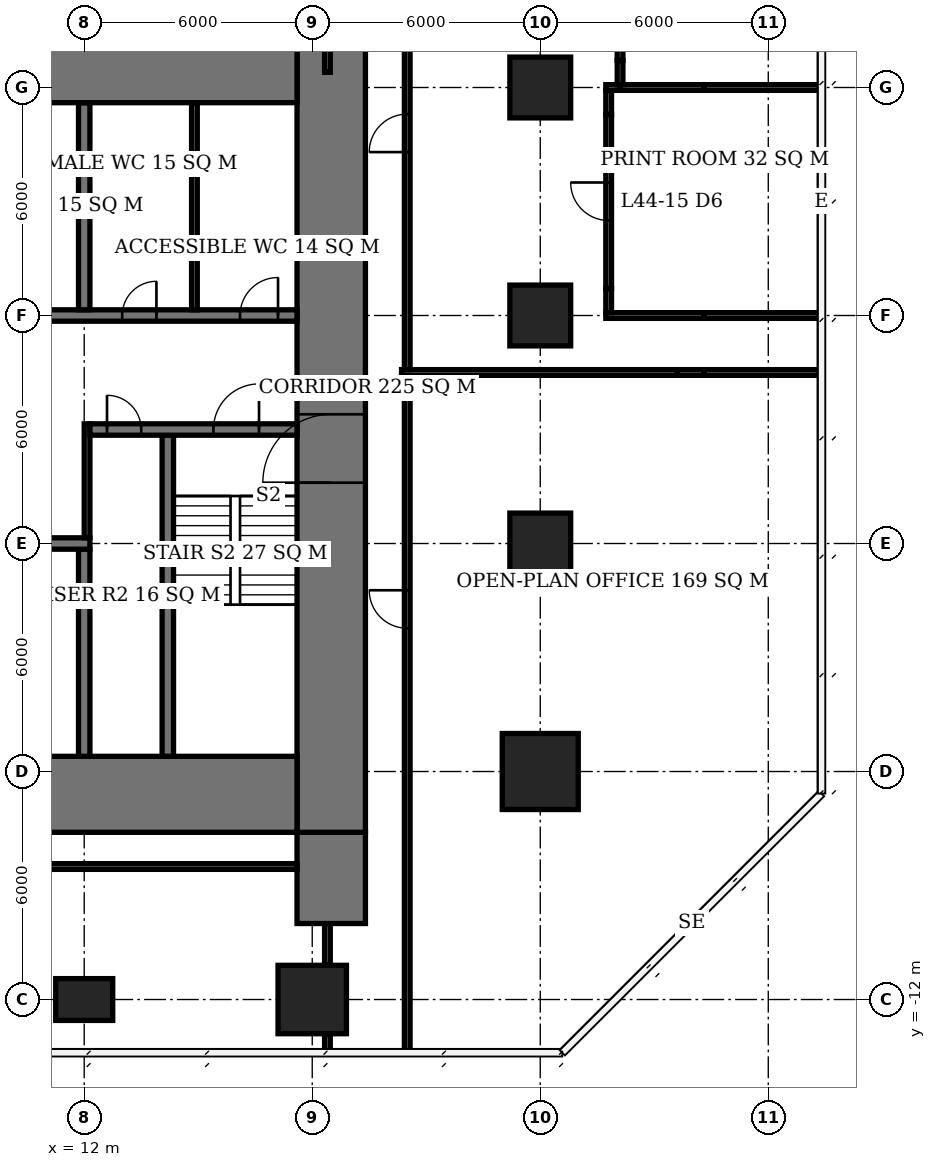
"""IFC4 building model, lengths in metres.
Left out: names, types, materials, properties, quantities, classifications, styles, units other than length and angle.
Written with IfcOpenShell. Run it as: python <this file> out.ifc"""

import sys

from ifc_helpers import new_model, si_unit, direction, frame, frame_2d, origin, origin_2d, place, context, subcontext, project, spatial, rectangle, extrude, element, fill, save


model = new_model("IFC4")
c1 = context("Model", 3, precision=1e-05, world=origin(), true_north=direction((0.0, 1.0)))
c2 = subcontext(c1, "Body", "Model", "MODEL_VIEW")
j1 = project(units=[si_unit("LENGTHUNIT", "METRE"), si_unit("PLANEANGLEUNIT", "RADIAN")], contexts=[c1])
p1 = place(None, origin())
s1 = spatial("IfcSite", under=j1, at=p1, CompositionType="ELEMENT")
p2 = place(p1, origin())
s2 = spatial("IfcBuilding", under=s1, at=p2, CompositionType="ELEMENT")
p3 = place(p2, frame((0.0, 0.0, 181.1)))
s3 = spatial("IfcBuildingStorey", under=s2, at=p3, CompositionType="ELEMENT", Elevation=181.1)
p4 = place(p3, frame((12.0, -12.0, 0.0), z_axis=(0.0, 0.0, 1.0), x_axis=(1.0, 0.0, 0.0)))
e1 = element("IfcColumn", 1, at=p4, inside=s3, PredefinedType="COLUMN", context=c2, shape_type="SweptSolid", body=[
    extrude(rectangle(XDim=1.5, YDim=1.1, at=origin_2d()), origin(), (0.0, 0.0, 1.0), 3.9),
])
p5 = place(p3, frame((18.0, -12.0, 0.0), z_axis=(0.0, 0.0, 1.0), x_axis=(1.0, 0.0, 0.0)))
e2 = element("IfcColumn", 2, at=p5, inside=s3, PredefinedType="COLUMN", context=c2, shape_type="SweptSolid", body=[
    extrude(rectangle(XDim=1.8, YDim=1.8, at=origin_2d()), origin(), (0.0, 0.0, 1.0), 3.9),
])
p6 = place(p3, frame((24.0, -6.0, 0.0), z_axis=(0.0, 0.0, 1.0), x_axis=(1.0, 0.0, 0.0)))
e3 = element("IfcColumn", 3, at=p6, inside=s3, PredefinedType="COLUMN", context=c2, shape_type="SweptSolid", body=[
    extrude(rectangle(XDim=2.0, YDim=2.0, at=origin_2d()), origin(), (0.0, 0.0, 1.0), 3.9),
])
for number, where, z_axis, x_axis in (
    (4, (24.0, 0.0, 0.0), (0.0, 0.0, 1.0), (1.0, 0.0, 0.0)),
    (5, (24.0, 6.0, 0.0), (0.0, 0.0, 1.0), (1.0, 0.0, 0.0)),
    (6, (24.0, 12.0, 0.0), (0.0, 0.0, 1.0), (1.0, 0.0, 0.0)),
):
    element("IfcColumn", number, at=place(p3, frame(where, z_axis=z_axis, x_axis=x_axis)), inside=s3, PredefinedType="COLUMN", context=c2, shape_type="SweptSolid", body=[
        extrude(rectangle(XDim=1.6, YDim=1.6, at=origin_2d()), origin(), (0.0, 0.0, 1.0), 3.9),
    ])
for number, where, z_axis, x_axis in (
    (7, (-5.6, -6.6, 0.0), (0.0, 0.0, 1.0), (1.0, 0.0, 0.0)),
    (8, (-5.6, 12.6, 0.0), (0.0, 0.0, 1.0), (1.0, 0.0, 0.0)),
):
    element("IfcWall", number, at=place(p3, frame(where, z_axis=z_axis, x_axis=x_axis)), inside=s3, PredefinedType="SHEAR", context=c2, shape_type="SweptSolid", body=[
        extrude(rectangle(XDim=23.2, YDim=2.0, at=frame_2d((11.6, 0.0))), origin(), (0.0, 0.0, 1.0), 3.9),
    ])
p7 = place(p3, frame((18.5, -7.6, 0.0), z_axis=(0.0, 0.0, 1.0), x_axis=(0.0, 1.0, 0.0)))
e9 = element("IfcWall", 9, at=p7, inside=s3, PredefinedType="SHEAR", context=c2, shape_type="SweptSolid", body=[
    extrude(rectangle(XDim=21.2, YDim=1.8, at=frame_2d((10.6, 0.0))), origin(), (0.0, 0.0, 1.0), 3.9),
])
p8 = place(p7, frame((9.2, 0.0, 0.0)))
e10 = element("IfcOpeningElement", 10, at=p8, cuts=e9, PredefinedType="OPENING", context=c2, shape_type="SweptSolid", body=[
    extrude(rectangle(XDim=1.8, YDim=2.4, at=frame_2d((0.9, 1.2))), frame((0.0, 0.91, 0.0), z_axis=(0.0, -1.0, 0.0), x_axis=(1.0, 0.0, 0.0)), (0.0, 0.0, 1.0), 1.82),
])
p9 = place(p3, frame((18.5, -10.0, 0.0), z_axis=(0.0, 0.0, 1.0), x_axis=(0.0, 1.0, 0.0)))
e11 = element("IfcWall", 11, at=p9, inside=s3, PredefinedType="SHEAR", context=c2, shape_type="SweptSolid", body=[
    extrude(rectangle(XDim=2.4, YDim=1.8, at=frame_2d((1.2, 0.0))), origin(), (0.0, 0.0, 1.0), 3.9),
])
p10 = place(p3, frame((-5.6, 0.0, 0.0), z_axis=(0.0, 0.0, 1.0), x_axis=(1.0, 0.0, 0.0)))
e12 = element("IfcWall", 12, at=p10, inside=s3, PredefinedType="SHEAR", context=c2, shape_type="SweptSolid", body=[
    extrude(rectangle(XDim=17.75, YDim=0.3, at=frame_2d((8.875, 0.0))), origin(), (0.0, 0.0, 1.0), 3.9),
])
p11 = place(p10, frame((0.6, 0.0, 0.0)))
e13 = element("IfcOpeningElement", 13, at=p11, cuts=e12, PredefinedType="OPENING", context=c2, shape_type="SweptSolid", body=[
    extrude(rectangle(XDim=0.9, YDim=2.1, at=frame_2d((0.45, 1.05))), frame((0.0, 0.16, 0.0), z_axis=(0.0, -1.0, 0.0), x_axis=(1.0, 0.0, 0.0)), (0.0, 0.0, 1.0), 0.32),
])
p12 = place(p10, frame((3.7, 0.0, 0.0)))
e14 = element("IfcOpeningElement", 14, at=p12, cuts=e12, PredefinedType="OPENING", context=c2, shape_type="SweptSolid", body=[
    extrude(rectangle(XDim=1.0, YDim=2.1, at=frame_2d((0.5, 1.05))), frame((0.0, 0.16, 0.0), z_axis=(0.0, -1.0, 0.0), x_axis=(1.0, 0.0, 0.0)), (0.0, 0.0, 1.0), 0.32),
])
p13 = place(p10, frame((9.6, 0.0, 0.0)))
e15 = element("IfcOpeningElement", 15, at=p13, cuts=e12, PredefinedType="OPENING", context=c2, shape_type="SweptSolid", body=[
    extrude(rectangle(XDim=1.0, YDim=2.1, at=frame_2d((0.5, 1.05))), frame((0.0, 0.16, 0.0), z_axis=(0.0, -1.0, 0.0), x_axis=(1.0, 0.0, 0.0)), (0.0, 0.0, 1.0), 0.32),
])
p14 = place(p10, frame((12.55, 0.0, 0.0)))
e16 = element("IfcOpeningElement", 16, at=p14, cuts=e12, PredefinedType="OPENING", context=c2, shape_type="SweptSolid", body=[
    extrude(rectangle(XDim=1.1, YDim=2.1, at=frame_2d((0.55, 1.05))), frame((0.0, 0.16, 0.0), z_axis=(0.0, -1.0, 0.0), x_axis=(1.0, 0.0, 0.0)), (0.0, 0.0, 1.0), 0.32),
])
p15 = place(p10, frame((15.55, 0.0, 0.0)))
e17 = element("IfcOpeningElement", 17, at=p15, cuts=e12, PredefinedType="OPENING", context=c2, shape_type="SweptSolid", body=[
    extrude(rectangle(XDim=1.1, YDim=2.1, at=frame_2d((0.55, 1.05))), frame((0.0, 0.16, 0.0), z_axis=(0.0, -1.0, 0.0), x_axis=(1.0, 0.0, 0.0)), (0.0, 0.0, 1.0), 0.32),
])
p16 = place(p3, frame((12.15, 3.0, 0.0), z_axis=(0.0, 0.0, 1.0), x_axis=(1.0, 0.0, 0.0)))
e18 = element("IfcWall", 18, at=p16, inside=s3, PredefinedType="SHEAR", context=c2, shape_type="SweptSolid", body=[
    extrude(rectangle(XDim=5.45, YDim=0.3, at=frame_2d((2.725, 0.0))), origin(), (0.0, 0.0, 1.0), 3.9),
])
p17 = place(p16, frame((3.25, 0.0, 0.0)))
e19 = element("IfcOpeningElement", 19, at=p17, cuts=e18, PredefinedType="OPENING", context=c2, shape_type="SweptSolid", body=[
    extrude(rectangle(XDim=1.2, YDim=2.1, at=frame_2d((0.6, 1.05))), frame((0.0, 0.16, 0.0), z_axis=(0.0, -1.0, 0.0), x_axis=(1.0, 0.0, 0.0)), (0.0, 0.0, 1.0), 0.32),
])
p18 = place(p16, frame((0.45, 0.0, 0.0)))
e20 = element("IfcOpeningElement", 20, at=p18, cuts=e18, PredefinedType="OPENING", context=c2, shape_type="SweptSolid", body=[
    extrude(rectangle(XDim=0.9, YDim=2.1, at=frame_2d((0.45, 1.05))), frame((0.0, 0.16, 0.0), z_axis=(0.0, -1.0, 0.0), x_axis=(1.0, 0.0, 0.0)), (0.0, 0.0, 1.0), 0.32),
])
p19 = place(p3, frame((-0.15, 6.0, 0.0), z_axis=(0.0, 0.0, 1.0), x_axis=(1.0, 0.0, 0.0)))
e21 = element("IfcWall", 21, at=p19, inside=s3, PredefinedType="SHEAR", context=c2, shape_type="SweptSolid", body=[
    extrude(rectangle(XDim=17.75, YDim=0.3, at=frame_2d((8.875, 0.0))), origin(), (0.0, 0.0, 1.0), 3.9),
])
p20 = place(p19, frame((13.15, 0.0, 0.0)))
e22 = element("IfcOpeningElement", 22, at=p20, cuts=e21, PredefinedType="OPENING", context=c2, shape_type="SweptSolid", body=[
    extrude(rectangle(XDim=0.9, YDim=2.1, at=frame_2d((0.45, 1.05))), frame((0.0, 0.16, 0.0), z_axis=(0.0, -1.0, 0.0), x_axis=(1.0, 0.0, 0.0)), (0.0, 0.0, 1.0), 0.32),
])
p21 = place(p19, frame((16.25, 0.0, 0.0)))
e23 = element("IfcOpeningElement", 23, at=p21, cuts=e21, PredefinedType="OPENING", context=c2, shape_type="SweptSolid", body=[
    extrude(rectangle(XDim=1.0, YDim=2.1, at=frame_2d((0.5, 1.05))), frame((0.0, 0.16, 0.0), z_axis=(0.0, -1.0, 0.0), x_axis=(1.0, 0.0, 0.0)), (0.0, 0.0, 1.0), 0.32),
])
p22 = place(p19, frame((7.25, 0.0, 0.0)))
e24 = element("IfcOpeningElement", 24, at=p22, cuts=e21, PredefinedType="OPENING", context=c2, shape_type="SweptSolid", body=[
    extrude(rectangle(XDim=1.0, YDim=2.1, at=frame_2d((0.5, 1.05))), frame((0.0, 0.16, 0.0), z_axis=(0.0, -1.0, 0.0), x_axis=(1.0, 0.0, 0.0)), (0.0, 0.0, 1.0), 0.32),
])
p23 = place(p19, frame((1.1, 0.0, 0.0)))
e25 = element("IfcOpeningElement", 25, at=p23, cuts=e21, PredefinedType="OPENING", context=c2, shape_type="SweptSolid", body=[
    extrude(rectangle(XDim=1.1, YDim=2.1, at=frame_2d((0.55, 1.05))), frame((0.0, 0.16, 0.0), z_axis=(0.0, -1.0, 0.0), x_axis=(1.0, 0.0, 0.0)), (0.0, 0.0, 1.0), 0.32),
])
p24 = place(p19, frame((4.1, 0.0, 0.0)))
e26 = element("IfcOpeningElement", 26, at=p24, cuts=e21, PredefinedType="OPENING", context=c2, shape_type="SweptSolid", body=[
    extrude(rectangle(XDim=1.1, YDim=2.1, at=frame_2d((0.55, 1.05))), frame((0.0, 0.16, 0.0), z_axis=(0.0, -1.0, 0.0), x_axis=(1.0, 0.0, 0.0)), (0.0, 0.0, 1.0), 0.32),
])
for number, where, z_axis, x_axis in (
    (27, (12.0, -5.6, 0.0), (0.0, 0.0, 1.0), (0.0, 1.0, 0.0)),
    (28, (12.0, 6.15, 0.0), (0.0, 0.0, 1.0), (0.0, 1.0, 0.0)),
):
    element("IfcWall", number, at=place(p3, frame(where, z_axis=z_axis, x_axis=x_axis)), inside=s3, PredefinedType="SHEAR", context=c2, shape_type="SweptSolid", body=[
        extrude(rectangle(XDim=5.45, YDim=0.3, at=frame_2d((2.725, 0.0))), origin(), (0.0, 0.0, 1.0), 3.9),
    ])
p25 = place(p3, frame((14.2, -5.6, 0.0), z_axis=(0.0, 0.0, 1.0), x_axis=(0.0, 1.0, 0.0)))
e29 = element("IfcWall", 29, at=p25, inside=s3, PredefinedType="SHEAR", context=c2, shape_type="SweptSolid", body=[
    extrude(rectangle(XDim=8.45, YDim=0.3, at=frame_2d((4.225, 0.0))), origin(), (0.0, 0.0, 1.0), 3.9),
])
p26 = place(p3, frame((14.9, 6.15, 0.0), z_axis=(0.0, 0.0, 1.0), x_axis=(0.0, 1.0, 0.0)))
e30 = element("IfcWall", 30, at=p26, inside=s3, PredefinedType="PLUMBINGWALL", context=c2, shape_type="SweptSolid", body=[
    extrude(rectangle(XDim=5.45, YDim=0.15, at=frame_2d((2.725, 0.0))), origin(), (0.0, 0.0, 1.0), 3.65),
])
p27 = place(p3, frame((25.725, 6.0, 0.0), z_axis=(0.0, 0.0, 1.0), x_axis=(1.0, 0.0, 0.0)))
e31 = element("IfcWall", 31, at=p27, inside=s3, PredefinedType="PARTITIONING", context=c2, shape_type="SweptSolid", body=[
    extrude(rectangle(XDim=2.585, YDim=0.15, at=frame_2d((1.292, 0.0))), origin(), (0.0, 0.0, 1.0), 2.65),
])
p28 = place(p3, frame((28.31, 6.0, 0.0), z_axis=(0.0, 0.0, 1.0), x_axis=(1.0, 0.0, 0.0)))
e32 = element("IfcWall", 32, at=p28, inside=s3, PredefinedType="PARTITIONING", context=c2, shape_type="SweptSolid", body=[
    extrude(rectangle(XDim=3.04, YDim=0.15, at=frame_2d((1.52, 0.0))), origin(), (0.0, 0.0, 1.0), 3.65),
])
p29 = place(p3, frame((25.725, 12.0, 0.0), z_axis=(0.0, 0.0, 1.0), x_axis=(1.0, 0.0, 0.0)))
e33 = element("IfcWall", 33, at=p29, inside=s3, PredefinedType="PARTITIONING", context=c2, shape_type="SweptSolid", body=[
    extrude(rectangle(XDim=0.45, YDim=0.15, at=frame_2d((0.225, 0.0))), origin(), (0.0, 0.0, 1.0), 2.65),
])
p30 = place(p3, frame((26.1, 12.0, 0.0), z_axis=(0.0, 0.0, 1.0), x_axis=(1.0, 0.0, 0.0)))
e34 = element("IfcWall", 34, at=p30, inside=s3, PredefinedType="PARTITIONING", context=c2, shape_type="SweptSolid", body=[
    extrude(rectangle(XDim=2.21, YDim=0.15, at=frame_2d((1.105, 0.0))), origin(), (0.0, 0.0, 1.0), 2.65),
])
p31 = place(p3, frame((28.31, 12.0, 0.0), z_axis=(0.0, 0.0, 1.0), x_axis=(1.0, 0.0, 0.0)))
e35 = element("IfcWall", 35, at=p31, inside=s3, PredefinedType="PARTITIONING", context=c2, shape_type="SweptSolid", body=[
    extrude(rectangle(XDim=3.04, YDim=0.15, at=frame_2d((1.52, 0.0))), origin(), (0.0, 0.0, 1.0), 3.65),
])
p32 = place(p3, frame((25.8, 6.075, 0.0), z_axis=(0.0, 0.0, 1.0), x_axis=(0.0, 1.0, 0.0)))
e36 = element("IfcWall", 36, at=p32, inside=s3, PredefinedType="PARTITIONING", context=c2, shape_type="SweptSolid", body=[
    extrude(rectangle(XDim=0.635, YDim=0.15, at=frame_2d((0.317, 0.0))), origin(), (0.0, 0.0, 1.0), 2.65),
])
p33 = place(p3, frame((25.8, 6.71, 0.0), z_axis=(0.0, 0.0, 1.0), x_axis=(0.0, 1.0, 0.0)))
e37 = element("IfcWall", 37, at=p33, inside=s3, PredefinedType="PARTITIONING", context=c2, shape_type="SweptSolid", body=[
    extrude(rectangle(XDim=4.58, YDim=0.15, at=frame_2d((2.29, 0.0))), origin(), (0.0, 0.0, 1.0), 3.65),
])
p34 = place(p33, frame((1.79, 0.0, 0.0)))
e38 = element("IfcOpeningElement", 38, at=p34, cuts=e37, PredefinedType="OPENING", context=c2, shape_type="SweptSolid", body=[
    extrude(rectangle(XDim=1.0, YDim=2.1, at=frame_2d((0.5, 1.05))), frame((0.0, 0.085, 0.0), z_axis=(0.0, -1.0, 0.0), x_axis=(1.0, 0.0, 0.0)), (0.0, 0.0, 1.0), 0.17),
])
for number, where, z_axis, x_axis in (
    (39, (25.8, 11.29, 0.0), (0.0, 0.0, 1.0), (0.0, 1.0, 0.0)),
    (40, (26.1, 12.075, 0.0), (0.0, 0.0, 1.0), (0.0, 1.0, 0.0)),
):
    element("IfcWall", number, at=place(p3, frame(where, z_axis=z_axis, x_axis=x_axis)), inside=s3, PredefinedType="PARTITIONING", context=c2, shape_type="SweptSolid", body=[
        extrude(rectangle(XDim=0.635, YDim=0.15, at=frame_2d((0.317, 0.0))), origin(), (0.0, 0.0, 1.0), 2.65),
    ])
p35 = place(p3, frame((26.1, 12.71, 0.0), z_axis=(0.0, 0.0, 1.0), x_axis=(0.0, 1.0, 0.0)))
e41 = element("IfcWall", 41, at=p35, inside=s3, PredefinedType="PARTITIONING", context=c2, shape_type="SweptSolid", body=[
    extrude(rectangle(XDim=4.58, YDim=0.15, at=frame_2d((2.29, 0.0))), origin(), (0.0, 0.0, 1.0), 3.65),
])
p36 = place(p35, frame((1.79, 0.0, 0.0)))
e42 = element("IfcOpeningElement", 42, at=p36, cuts=e41, PredefinedType="OPENING", context=c2, shape_type="SweptSolid", body=[
    extrude(rectangle(XDim=1.0, YDim=2.1, at=frame_2d((0.5, 1.05))), frame((0.0, 0.085, 0.0), z_axis=(0.0, -1.0, 0.0), x_axis=(1.0, 0.0, 0.0)), (0.0, 0.0, 1.0), 0.17),
])
p37 = place(p3, frame((17.6, -8.5, 0.0), z_axis=(0.0, 0.0, 1.0), x_axis=(-1.0, 0.0, 0.0)))
e43 = element("IfcWall", 43, at=p37, inside=s3, PredefinedType="PARTITIONING", context=c2, shape_type="SweptSolid", body=[
    extrude(rectangle(XDim=23.2, YDim=0.15, at=frame_2d((11.6, 0.0))), origin(), (0.0, 0.0, 1.0), 3.65),
])
p38 = place(p37, frame((14.58, 0.0, 0.0)))
e44 = element("IfcOpeningElement", 44, at=p38, cuts=e43, PredefinedType="OPENING", context=c2, shape_type="SweptSolid", body=[
    extrude(rectangle(XDim=1.0, YDim=2.1, at=frame_2d((0.5, 1.05))), frame((0.0, 0.085, 0.0), z_axis=(0.0, -1.0, 0.0), x_axis=(1.0, 0.0, 0.0)), (0.0, 0.0, 1.0), 0.17),
])
p39 = place(p3, frame((18.4, -13.35, 0.0), z_axis=(0.0, 0.0, 1.0), x_axis=(0.0, 1.0, 0.0)))
e45 = element("IfcWall", 45, at=p39, inside=s3, PredefinedType="PARTITIONING", context=c2, shape_type="SweptSolid", body=[
    extrude(rectangle(XDim=0.45, YDim=0.15, at=frame_2d((0.225, 0.0))), origin(), (0.0, 0.0, 1.0), 3.65),
])
p40 = place(p3, frame((18.4, -11.1, 0.0), z_axis=(0.0, 0.0, 1.0), x_axis=(0.0, 1.0, 0.0)))
e46 = element("IfcWall", 46, at=p40, inside=s3, PredefinedType="PARTITIONING", context=c2, shape_type="SweptSolid", body=[
    extrude(rectangle(XDim=1.1, YDim=0.15, at=frame_2d((0.55, 0.0))), origin(), (0.0, 0.0, 1.0), 3.65),
])
p41 = place(p3, frame((18.4, 12.4, 0.0), z_axis=(0.0, 0.0, 1.0), x_axis=(0.0, 1.0, 0.0)))
e47 = element("IfcWall", 47, at=p41, inside=s3, PredefinedType="PARTITIONING", context=c2, shape_type="SweptSolid", body=[
    extrude(rectangle(XDim=1.2, YDim=0.15, at=frame_2d((0.6, 0.0))), origin(), (0.0, 0.0, 1.0), 3.65),
])
p42 = place(p3, frame((20.5, -13.4, 0.0), z_axis=(0.0, 0.0, 1.0), x_axis=(0.0, 1.0, 0.0)))
e48 = element("IfcWall", 48, at=p42, inside=s3, PredefinedType="PARTITIONING", context=c2, shape_type="SweptSolid", body=[
    extrude(rectangle(XDim=17.825, YDim=0.15, at=frame_2d((8.913, 0.0))), origin(), (0.0, 0.0, 1.0), 3.65),
])
p43 = place(p42, frame((11.17, 0.0, 0.0)))
e49 = element("IfcOpeningElement", 49, at=p43, cuts=e48, PredefinedType="OPENING", context=c2, shape_type="SweptSolid", body=[
    extrude(rectangle(XDim=1.0, YDim=2.1, at=frame_2d((0.5, 1.05))), frame((0.0, 0.085, 0.0), z_axis=(0.0, -1.0, 0.0), x_axis=(1.0, 0.0, 0.0)), (0.0, 0.0, 1.0), 0.17),
])
p44 = place(p3, frame((20.5, 4.575, 0.0), z_axis=(0.0, 0.0, 1.0), x_axis=(0.0, 1.0, 0.0)))
e50 = element("IfcWall", 50, at=p44, inside=s3, PredefinedType="PARTITIONING", context=c2, shape_type="SweptSolid", body=[
    extrude(rectangle(XDim=17.85, YDim=0.15, at=frame_2d((8.925, 0.0))), origin(), (0.0, 0.0, 1.0), 3.65),
])
p45 = place(p44, frame((5.725, 0.0, 0.0)))
e51 = element("IfcOpeningElement", 51, at=p45, cuts=e50, PredefinedType="OPENING", context=c2, shape_type="SweptSolid", body=[
    extrude(rectangle(XDim=1.0, YDim=2.1, at=frame_2d((0.5, 1.05))), frame((0.0, 0.085, 0.0), z_axis=(0.0, -1.0, 0.0), x_axis=(1.0, 0.0, 0.0)), (0.0, 0.0, 1.0), 0.17),
])
p46 = place(p3, frame((20.35, 4.5, 0.0), z_axis=(0.0, 0.0, 1.0), x_axis=(1.0, 0.0, 0.0)))
e52 = element("IfcWall", 52, at=p46, inside=s3, PredefinedType="PARTITIONING", context=c2, shape_type="SweptSolid", body=[
    extrude(rectangle(XDim=7.24, YDim=0.15, at=frame_2d((3.62, 0.0))), origin(), (0.0, 0.0, 1.0), 3.65),
])
p47 = place(p3, frame((27.59, 4.5, 0.0), z_axis=(0.0, 0.0, 1.0), x_axis=(1.0, 0.0, 0.0)))
e53 = element("IfcWall", 53, at=p47, inside=s3, PredefinedType="PARTITIONING", context=c2, shape_type="SweptSolid", body=[
    extrude(rectangle(XDim=0.72, YDim=0.15, at=frame_2d((0.36, 0.0))), origin(), (0.0, 0.0, 1.0), 2.65),
])
p48 = place(p3, frame((28.31, 4.5, 0.0), z_axis=(0.0, 0.0, 1.0), x_axis=(1.0, 0.0, 0.0)))
e54 = element("IfcWall", 54, at=p48, inside=s3, PredefinedType="PARTITIONING", context=c2, shape_type="SweptSolid", body=[
    extrude(rectangle(XDim=3.09, YDim=0.15, at=frame_2d((1.545, 0.0))), origin(), (0.0, 0.0, 1.0), 3.65),
])
p49 = place(p3, frame((12.075, 0.15, 0.0), z_axis=(0.0, 0.0, 1.0), x_axis=(0.0, 1.0, 0.0)))
e55 = element("IfcWall", 55, at=p49, inside=s3, PredefinedType="PARTITIONING", context=c2, shape_type="SweptSolid", body=[
    extrude(rectangle(XDim=3.0, YDim=0.15, at=frame_2d((1.5, 0.0))), origin(), (0.0, 0.0, 1.0), 3.65),
])
p50 = place(p8, origin())
e56 = element("IfcDoor", 56, at=p50, inside=s3, OperationType="DOUBLE_DOOR_SINGLE_SWING", PredefinedType="DOOR", context=c2, shape_type="SweptSolid", body=[
    extrude(rectangle(XDim=1.8, YDim=2.4, at=frame_2d((0.9, 1.2))), frame((0.0, 0.025, 0.0), z_axis=(0.0, -1.0, 0.0), x_axis=(1.0, 0.0, 0.0)), (0.0, 0.0, 1.0), 0.05),
])
fill(e10, e56)
p51 = place(p17, origin())
e57 = element("IfcDoor", 57, at=p51, inside=s3, OperationType="SINGLE_SWING_RIGHT", PredefinedType="DOOR", context=c2, shape_type="SweptSolid", body=[
    extrude(rectangle(XDim=1.2, YDim=2.1, at=frame_2d((0.6, 1.05))), frame((0.0, 0.025, 0.0), z_axis=(0.0, -1.0, 0.0), x_axis=(1.0, 0.0, 0.0)), (0.0, 0.0, 1.0), 0.05),
])
fill(e19, e57)
p52 = place(p18, origin())
e58 = element("IfcDoor", 58, at=p52, inside=s3, OperationType="SINGLE_SWING_LEFT", PredefinedType="DOOR", context=c2, shape_type="SweptSolid", body=[
    extrude(rectangle(XDim=0.9, YDim=2.1, at=frame_2d((0.45, 1.05))), frame((0.0, 0.025, 0.0), z_axis=(0.0, -1.0, 0.0), x_axis=(1.0, 0.0, 0.0)), (0.0, 0.0, 1.0), 0.05),
])
fill(e20, e58)
p53 = place(p20, origin())
e59 = element("IfcDoor", 59, at=p53, inside=s3, OperationType="SINGLE_SWING_RIGHT", PredefinedType="DOOR", context=c2, shape_type="SweptSolid", body=[
    extrude(rectangle(XDim=0.9, YDim=2.1, at=frame_2d((0.45, 1.05))), frame((0.0, 0.025, 0.0), z_axis=(0.0, -1.0, 0.0), x_axis=(1.0, 0.0, 0.0)), (0.0, 0.0, 1.0), 0.05),
])
fill(e22, e59)
p54 = place(p21, origin())
e60 = element("IfcDoor", 60, at=p54, inside=s3, OperationType="SINGLE_SWING_RIGHT", PredefinedType="DOOR", context=c2, shape_type="SweptSolid", body=[
    extrude(rectangle(XDim=1.0, YDim=2.1, at=frame_2d((0.5, 1.05))), frame((0.0, 0.025, 0.0), z_axis=(0.0, -1.0, 0.0), x_axis=(1.0, 0.0, 0.0)), (0.0, 0.0, 1.0), 0.05),
])
fill(e23, e60)
p55 = place(p34, origin())
e61 = element("IfcDoor", 61, at=p55, inside=s3, OperationType="SINGLE_SWING_RIGHT", PredefinedType="DOOR", context=c2, shape_type="SweptSolid", body=[
    extrude(rectangle(XDim=1.0, YDim=2.1, at=frame_2d((0.5, 1.05))), frame((0.0, 0.025, 0.0), z_axis=(0.0, -1.0, 0.0), x_axis=(1.0, 0.0, 0.0)), (0.0, 0.0, 1.0), 0.05),
])
fill(e38, e61)
p56 = place(p43, origin())
e62 = element("IfcDoor", 62, at=p56, inside=s3, OperationType="SINGLE_SWING_RIGHT", PredefinedType="DOOR", context=c2, shape_type="SweptSolid", body=[
    extrude(rectangle(XDim=1.0, YDim=2.1, at=frame_2d((0.5, 1.05))), frame((0.0, 0.025, 0.0), z_axis=(0.0, -1.0, 0.0), x_axis=(1.0, 0.0, 0.0)), (0.0, 0.0, 1.0), 0.05),
])
fill(e49, e62)
p57 = place(p45, origin())
e63 = element("IfcDoor", 63, at=p57, inside=s3, OperationType="SINGLE_SWING_LEFT", PredefinedType="DOOR", context=c2, shape_type="SweptSolid", body=[
    extrude(rectangle(XDim=1.0, YDim=2.1, at=frame_2d((0.5, 1.05))), frame((0.0, 0.025, 0.0), z_axis=(0.0, -1.0, 0.0), x_axis=(1.0, 0.0, 0.0)), (0.0, 0.0, 1.0), 0.05),
])
fill(e51, e63)
save(model, sys.argv[1])
